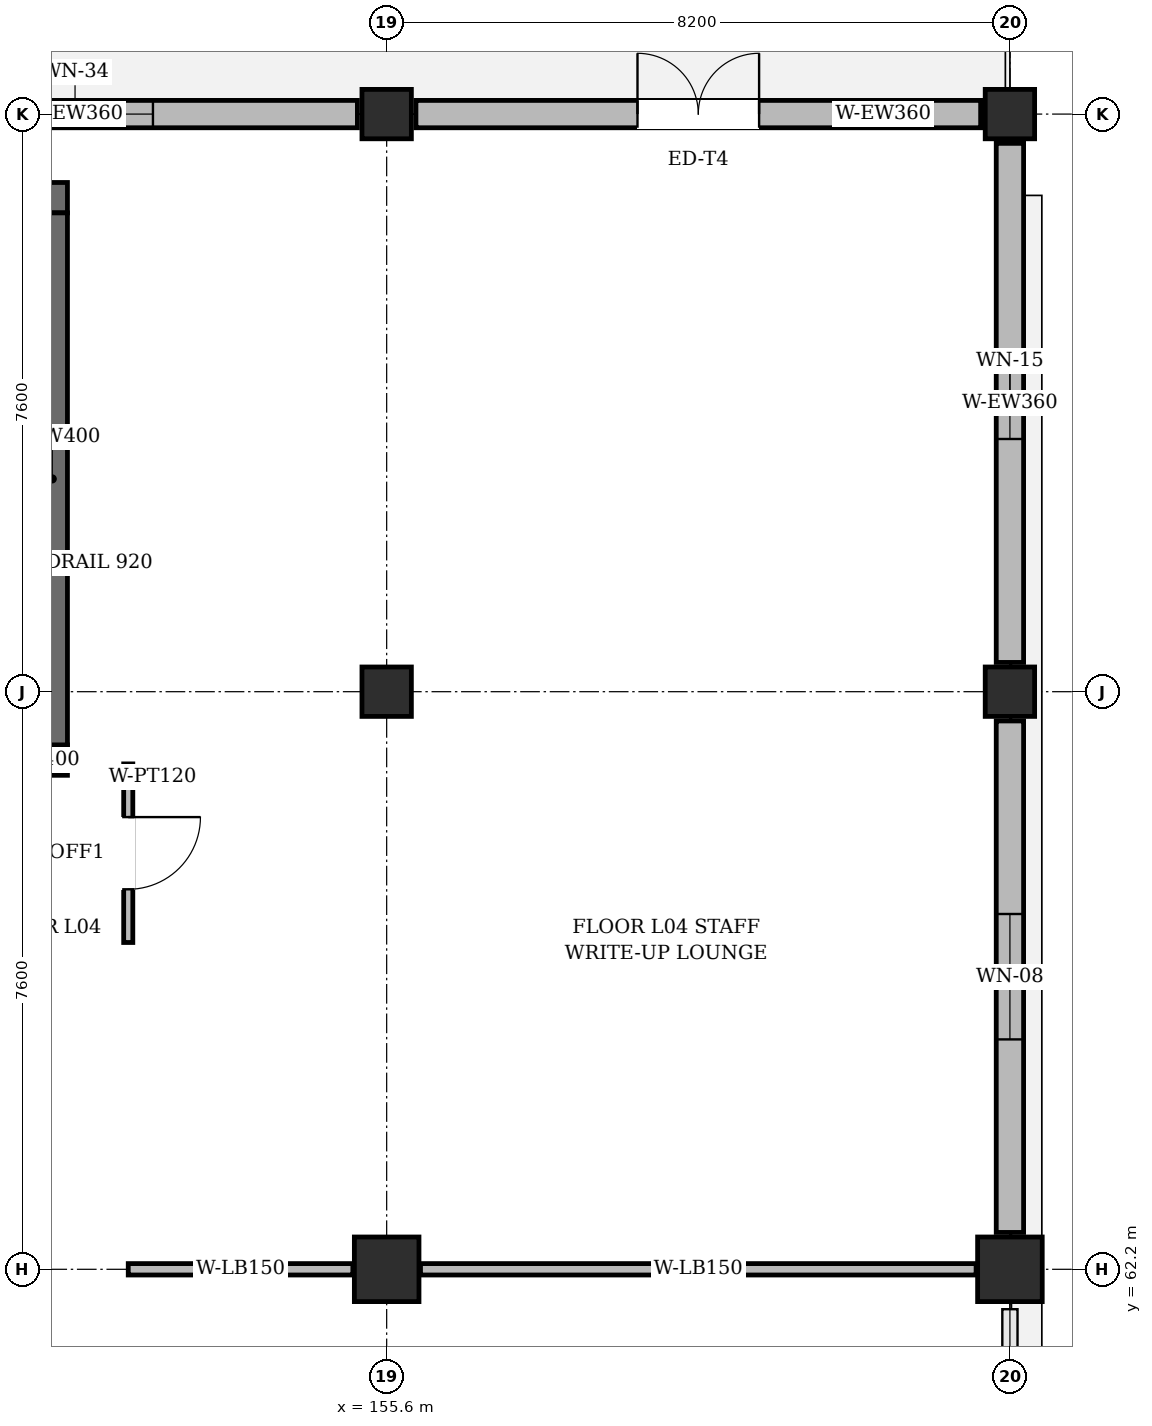
"""IFC4 building model, lengths in metres.
Left out: names, types, materials, properties, quantities, classifications, styles, units other than length and angle.
Written with IfcOpenShell. Run it as: python <this file> out.ifc"""

import sys

from ifc_helpers import new_model, si_unit, direction, frame, frame_2d, origin, origin_2d, place, context, subcontext, project, spatial, rectangle, extrude, element, fill, save


model = new_model("IFC4")
c1 = context("Model", 3, precision=1e-05, world=origin(), true_north=direction((0.0, 1.0)))
c2 = subcontext(c1, "Body", "Model", "MODEL_VIEW")
j1 = project(units=[si_unit("LENGTHUNIT", "METRE"), si_unit("PLANEANGLEUNIT", "RADIAN")], contexts=[c1])
p1 = place(None, origin())
s1 = spatial("IfcSite", under=j1, at=p1, CompositionType="ELEMENT")
p2 = place(p1, origin())
s2 = spatial("IfcBuilding", under=s1, at=p2, CompositionType="ELEMENT")
p3 = place(p2, frame((0.0, 0.0, 19.8)))
s3 = spatial("IfcBuildingStorey", under=s2, at=p3, CompositionType="ELEMENT", Elevation=19.8)
p4 = place(p3, frame((155.6, 62.2, 0.0), z_axis=(0.0, 0.0, 1.0), x_axis=(1.0, 0.0, 0.0)))
e1 = element("IfcColumn", 1, at=p4, inside=s3, PredefinedType="COLUMN", context=c2, shape_type="SweptSolid", body=[
    extrude(rectangle(XDim=0.85, YDim=0.85, at=origin_2d()), origin(), (0.0, 0.0, 1.0), 3.94),
])
for number, where, z_axis, x_axis in (
    (2, (155.6, 69.8, 0.0), (0.0, 0.0, 1.0), (1.0, 0.0, 0.0)),
    (3, (155.6, 77.4, 0.0), (0.0, 0.0, 1.0), (1.0, 0.0, 0.0)),
):
    element("IfcColumn", number, at=place(p3, frame(where, z_axis=z_axis, x_axis=x_axis)), inside=s3, PredefinedType="COLUMN", context=c2, shape_type="SweptSolid", body=[
        extrude(rectangle(XDim=0.65, YDim=0.65, at=origin_2d()), origin(), (0.0, 0.0, 1.0), 3.94),
    ])
p5 = place(p3, frame((163.8, 62.2, 0.0), z_axis=(0.0, 0.0, 1.0), x_axis=(1.0, 0.0, 0.0)))
e4 = element("IfcColumn", 4, at=p5, inside=s3, PredefinedType="COLUMN", context=c2, shape_type="SweptSolid", body=[
    extrude(rectangle(XDim=0.85, YDim=0.85, at=origin_2d()), origin(), (0.0, 0.0, 1.0), 3.94),
])
for number, where, z_axis, x_axis in (
    (5, (163.8, 69.8, 0.0), (0.0, 0.0, 1.0), (1.0, 0.0, 0.0)),
    (6, (163.8, 77.4, 0.0), (0.0, 0.0, 1.0), (1.0, 0.0, 0.0)),
):
    element("IfcColumn", number, at=place(p3, frame(where, z_axis=z_axis, x_axis=x_axis)), inside=s3, PredefinedType="COLUMN", context=c2, shape_type="SweptSolid", body=[
        extrude(rectangle(XDim=0.65, YDim=0.65, at=origin_2d()), origin(), (0.0, 0.0, 1.0), 3.94),
    ])
p6 = place(p3, frame((163.8, 62.685, 0.0), z_axis=(0.0, 0.0, 1.0), x_axis=(0.0, 1.0, 0.0)))
e7 = element("IfcWall", 7, at=p6, inside=s3, PredefinedType="SOLIDWALL", context=c2, shape_type="SweptSolid", body=[
    extrude(rectangle(XDim=6.73, YDim=0.36, at=frame_2d((3.365, 0.0))), origin(), (0.0, 0.0, 1.0), 3.325),
])
p7 = place(p6, frame((2.54, 0.0, 0.95)))
e8 = element("IfcOpeningElement", 8, at=p7, cuts=e7, PredefinedType="OPENING", context=c2, shape_type="SweptSolid", body=[
    extrude(rectangle(XDim=1.65, YDim=2.0, at=frame_2d((0.825, 1.0))), frame((0.0, 0.192, 0.0), z_axis=(0.0, -1.0, 0.0), x_axis=(1.0, 0.0, 0.0)), (0.0, 0.0, 1.0), 0.384),
])
p8 = place(p3, frame((163.8, 70.185, 0.0), z_axis=(0.0, 0.0, 1.0), x_axis=(0.0, 1.0, 0.0)))
e9 = element("IfcWall", 9, at=p8, inside=s3, PredefinedType="SOLIDWALL", context=c2, shape_type="SweptSolid", body=[
    extrude(rectangle(XDim=6.83, YDim=0.36, at=frame_2d((3.415, 0.0))), origin(), (0.0, 0.0, 1.0), 3.325),
])
p9 = place(p8, frame((2.94, 0.0, 0.95)))
e10 = element("IfcOpeningElement", 10, at=p9, cuts=e9, PredefinedType="OPENING", context=c2, shape_type="SweptSolid", body=[
    extrude(rectangle(XDim=0.95, YDim=1.75, at=frame_2d((0.475, 0.875))), frame((0.0, 0.192, 0.0), z_axis=(0.0, -1.0, 0.0), x_axis=(1.0, 0.0, 0.0)), (0.0, 0.0, 1.0), 0.384),
])
p10 = place(p3, frame((163.415, 77.4, 0.0), z_axis=(0.0, 0.0, 1.0), x_axis=(-1.0, 0.0, 0.0)))
e11 = element("IfcWall", 11, at=p10, inside=s3, PredefinedType="SOLIDWALL", context=c2, shape_type="SweptSolid", body=[
    extrude(rectangle(XDim=7.43, YDim=0.36, at=frame_2d((3.715, 0.0))), origin(), (0.0, 0.0, 1.0), 3.325),
])
p11 = place(p10, frame((2.915, 0.0, 0.0)))
e12 = element("IfcOpeningElement", 12, at=p11, cuts=e11, PredefinedType="OPENING", context=c2, shape_type="SweptSolid", body=[
    extrude(rectangle(XDim=1.6, YDim=2.2, at=frame_2d((0.8, 1.1))), frame((0.0, 0.192, 0.0), z_axis=(0.0, -1.0, 0.0), x_axis=(1.0, 0.0, 0.0)), (0.0, 0.0, 1.0), 0.384),
])
p12 = place(p3, frame((155.215, 77.4, 0.0), z_axis=(0.0, 0.0, 1.0), x_axis=(-1.0, 0.0, 0.0)))
e13 = element("IfcWall", 13, at=p12, inside=s3, PredefinedType="SOLIDWALL", context=c2, shape_type="SweptSolid", body=[
    extrude(rectangle(XDim=7.43, YDim=0.36, at=frame_2d((3.715, 0.0))), origin(), (0.0, 0.0, 1.0), 3.325),
])
p13 = place(p12, frame((2.69, 0.0, 0.95)))
e14 = element("IfcOpeningElement", 14, at=p13, cuts=e13, PredefinedType="OPENING", context=c2, shape_type="SweptSolid", body=[
    extrude(rectangle(XDim=2.05, YDim=1.5, at=frame_2d((1.025, 0.75))), frame((0.0, 0.192, 0.0), z_axis=(0.0, -1.0, 0.0), x_axis=(1.0, 0.0, 0.0)), (0.0, 0.0, 1.0), 0.384),
])
p14 = place(p3, frame((147.6, 68.9, 0.0), z_axis=(0.0, 0.0, 1.0), x_axis=(1.0, 0.0, 0.0)))
e15 = element("IfcWall", 15, at=p14, inside=s3, PredefinedType="SHEAR", context=c2, shape_type="SweptSolid", body=[
    extrude(rectangle(XDim=3.8, YDim=0.4, at=frame_2d((1.9, 0.0))), origin(), (0.0, 0.0, 1.0), 3.94),
])
p15 = place(p14, frame((1.3, 0.0, 0.0)))
e16 = element("IfcOpeningElement", 16, at=p15, cuts=e15, PredefinedType="OPENING", context=c2, shape_type="SweptSolid", body=[
    extrude(rectangle(XDim=1.2, YDim=2.2, at=frame_2d((0.6, 1.1))), frame((0.0, 0.212, 0.0), z_axis=(0.0, -1.0, 0.0), x_axis=(1.0, 0.0, 0.0)), (0.0, 0.0, 1.0), 0.424),
])
p16 = place(p3, frame((147.6, 76.3, 0.0), z_axis=(0.0, 0.0, 1.0), x_axis=(1.0, 0.0, 0.0)))
e17 = element("IfcWall", 17, at=p16, inside=s3, PredefinedType="SHEAR", context=c2, shape_type="SweptSolid", body=[
    extrude(rectangle(XDim=3.8, YDim=0.4, at=frame_2d((1.9, 0.0))), origin(), (0.0, 0.0, 1.0), 3.94),
])
p17 = place(p3, frame((151.2, 69.1, 0.0), z_axis=(0.0, 0.0, 1.0), x_axis=(0.0, 1.0, 0.0)))
e18 = element("IfcWall", 18, at=p17, inside=s3, PredefinedType="SHEAR", context=c2, shape_type="SweptSolid", body=[
    extrude(rectangle(XDim=7.0, YDim=0.4, at=frame_2d((3.5, 0.0))), origin(), (0.0, 0.0, 1.0), 3.94),
])
p18 = place(p3, frame((152.2, 68.85, 0.0), z_axis=(0.0, 0.0, 1.0), x_axis=(0.0, -1.0, 0.0)))
e19 = element("IfcWall", 19, at=p18, inside=s3, PredefinedType="PARTITIONING", context=c2, shape_type="SweptSolid", body=[
    extrude(rectangle(XDim=2.35, YDim=0.12, at=frame_2d((1.175, 0.0))), origin(), (0.0, 0.0, 1.0), 3.805),
])
p19 = place(p18, frame((0.7, 0.0, 0.0)))
e20 = element("IfcOpeningElement", 20, at=p19, cuts=e19, PredefinedType="OPENING", context=c2, shape_type="SweptSolid", body=[
    extrude(rectangle(XDim=0.95, YDim=2.2, at=frame_2d((0.475, 1.1))), frame((0.0, 0.072, 0.0), z_axis=(0.0, -1.0, 0.0), x_axis=(1.0, 0.0, 0.0)), (0.0, 0.0, 1.0), 0.144),
])
p20 = place(p3, frame((152.2, 62.2, 0.0), z_axis=(0.0, 0.0, 1.0), x_axis=(1.0, 0.0, 0.0)))
e21 = element("IfcWall", 21, at=p20, inside=s3, PredefinedType="PARTITIONING", context=c2, shape_type="SweptSolid", body=[
    extrude(rectangle(XDim=2.955, YDim=0.15, at=frame_2d((1.478, 0.0))), origin(), (0.0, 0.0, 1.0), 3.275),
])
p21 = place(p3, frame((156.045, 62.2, 0.0), z_axis=(0.0, 0.0, 1.0), x_axis=(1.0, 0.0, 0.0)))
e22 = element("IfcWall", 22, at=p21, inside=s3, PredefinedType="PARTITIONING", context=c2, shape_type="SweptSolid", body=[
    extrude(rectangle(XDim=7.31, YDim=0.15, at=frame_2d((3.655, 0.0))), origin(), (0.0, 0.0, 1.0), 3.275),
])
p22 = place(p7, origin())
e23 = element("IfcWindow", 23, at=p22, inside=s3, PartitioningType="DOUBLE_PANEL_VERTICAL", PredefinedType="WINDOW", context=c2, shape_type="SweptSolid", body=[
    extrude(rectangle(XDim=1.65, YDim=2.0, at=frame_2d((0.825, 1.0))), frame((0.0, 0.03, 0.0), z_axis=(0.0, -1.0, 0.0), x_axis=(1.0, 0.0, 0.0)), (0.0, 0.0, 1.0), 0.06),
])
fill(e8, e23)
p23 = place(p9, origin())
e24 = element("IfcWindow", 24, at=p23, inside=s3, PartitioningType="SINGLE_PANEL", PredefinedType="WINDOW", context=c2, shape_type="SweptSolid", body=[
    extrude(rectangle(XDim=0.95, YDim=1.75, at=frame_2d((0.475, 0.875))), frame((0.0, 0.03, 0.0), z_axis=(0.0, -1.0, 0.0), x_axis=(1.0, 0.0, 0.0)), (0.0, 0.0, 1.0), 0.06),
])
fill(e10, e24)
p24 = place(p11, frame((1.6, 0.0, 0.0), z_axis=(0.0, 0.0, 1.0), x_axis=(-1.0, 0.0, 0.0)))
e25 = element("IfcDoor", 25, at=p24, inside=s3, OperationType="DOUBLE_DOOR_SINGLE_SWING", PredefinedType="DOOR", context=c2, shape_type="SweptSolid", body=[
    extrude(rectangle(XDim=1.6, YDim=2.2, at=frame_2d((0.8, 1.1))), frame((0.0, 0.025, 0.0), z_axis=(0.0, -1.0, 0.0), x_axis=(1.0, 0.0, 0.0)), (0.0, 0.0, 1.0), 0.05),
])
fill(e12, e25)
p25 = place(p13, origin())
e26 = element("IfcWindow", 26, at=p25, inside=s3, PartitioningType="DOUBLE_PANEL_VERTICAL", PredefinedType="WINDOW", context=c2, shape_type="SweptSolid", body=[
    extrude(rectangle(XDim=2.05, YDim=1.5, at=frame_2d((1.025, 0.75))), frame((0.0, 0.03, 0.0), z_axis=(0.0, -1.0, 0.0), x_axis=(1.0, 0.0, 0.0)), (0.0, 0.0, 1.0), 0.06),
])
fill(e14, e26)
p26 = place(p19, origin())
e27 = element("IfcDoor", 27, at=p26, inside=s3, OperationType="SINGLE_SWING_LEFT", PredefinedType="DOOR", context=c2, shape_type="SweptSolid", body=[
    extrude(rectangle(XDim=0.95, YDim=2.2, at=frame_2d((0.475, 1.1))), frame((0.0, 0.025, 0.0), z_axis=(0.0, -1.0, 0.0), x_axis=(1.0, 0.0, 0.0)), (0.0, 0.0, 1.0), 0.05),
])
fill(e20, e27)
save(model, sys.argv[1])
